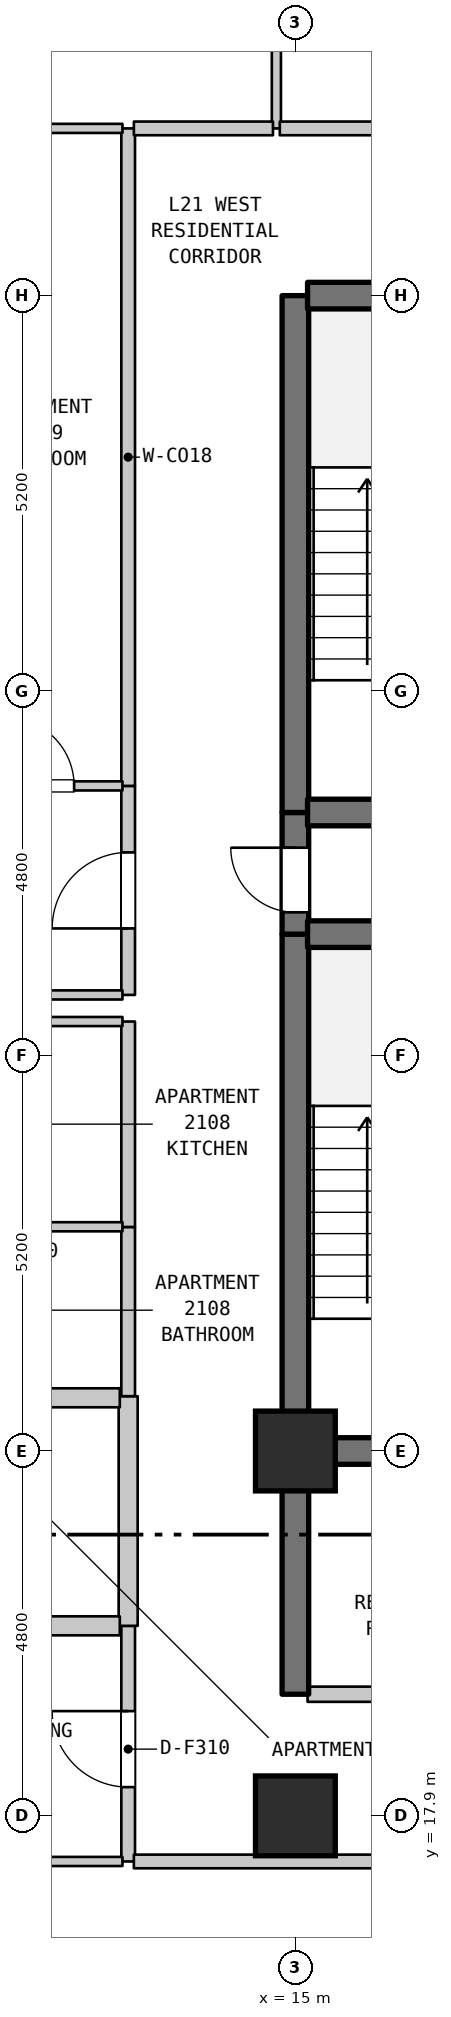
"""IFC4 building model, lengths in metres.
Left out: names, types, materials, properties, quantities, classifications, styles, units other than length and angle.
Written with IfcOpenShell. Run it as: python <this file> out.ifc"""

import sys

from ifc_helpers import new_model, si_unit, direction, frame, frame_2d, origin, origin_2d, place, context, subcontext, project, spatial, rectangle, extrude, element, fill, save


model = new_model("IFC4")
c1 = context("Model", 3, precision=1e-05, world=origin(), true_north=direction((0.0, 1.0)))
c2 = subcontext(c1, "Body", "Model", "MODEL_VIEW")
j1 = project(units=[si_unit("LENGTHUNIT", "METRE"), si_unit("PLANEANGLEUNIT", "RADIAN")], contexts=[c1])
p1 = place(None, origin())
s1 = spatial("IfcSite", under=j1, at=p1, CompositionType="ELEMENT")
p2 = place(p1, origin())
s2 = spatial("IfcBuilding", under=s1, at=p2, CompositionType="ELEMENT")
p3 = place(p2, frame((0.0, 0.0, 90.9)))
s3 = spatial("IfcBuildingStorey", under=s2, at=p3, CompositionType="ELEMENT", Elevation=90.9)
for number, where, z_axis, x_axis in (
    (1, (15.0, 17.9, 0.0), (0.0, 0.0, 1.0), (1.0, 0.0, 0.0)),
    (2, (15.0, 22.7, 0.0), (0.0, 0.0, 1.0), (1.0, 0.0, 0.0)),
):
    element("IfcColumn", number, at=place(p3, frame(where, z_axis=z_axis, x_axis=x_axis)), inside=s3, PredefinedType="COLUMN", context=c2, shape_type="SweptSolid", body=[
        extrude(rectangle(XDim=1.05, YDim=1.05, at=origin_2d()), origin(), (0.0, 0.0, 1.0), 3.7),
    ])
p4 = place(p3, frame((12.8, 17.3, 0.0), z_axis=(0.0, 0.0, 1.0), x_axis=(0.0, 1.0, 0.0)))
e3 = element("IfcWall", 3, at=p4, inside=s3, PredefinedType="STANDARD", context=c2, shape_type="SweptSolid", body=[
    extrude(rectangle(XDim=3.1, YDim=0.18, at=frame_2d((1.55, 0.0))), origin(), (0.0, 0.0, 1.0), 3.385),
])
p5 = place(p4, frame((0.978, 0.0, 0.0)))
e4 = element("IfcOpeningElement", 4, at=p5, cuts=e3, PredefinedType="OPENING", context=c2, shape_type="SweptSolid", body=[
    extrude(rectangle(XDim=1.0, YDim=2.15, at=frame_2d((0.5, 1.075))), frame((0.0, 0.1, 0.0), z_axis=(0.0, -1.0, 0.0), x_axis=(1.0, 0.0, 0.0)), (0.0, 0.0, 1.0), 0.2),
])
p6 = place(p3, frame((12.8, 20.4, 0.0), z_axis=(0.0, 0.0, 1.0), x_axis=(0.0, 1.0, 0.0)))
e5 = element("IfcWall", 5, at=p6, inside=s3, PredefinedType="STANDARD", context=c2, shape_type="SweptSolid", body=[
    extrude(rectangle(XDim=3.021, YDim=0.25, at=frame_2d((1.51, 0.0))), origin(), (0.0, 0.0, 1.0), 3.385),
])
p7 = place(p3, frame((12.8, 23.421, 0.0), z_axis=(0.0, 0.0, 1.0), x_axis=(0.0, 1.0, 0.0)))
e6 = element("IfcWall", 6, at=p7, inside=s3, PredefinedType="STANDARD", context=c2, shape_type="SweptSolid", body=[
    extrude(rectangle(XDim=2.226, YDim=0.18, at=frame_2d((1.113, 0.0))), origin(), (0.0, 0.0, 1.0), 3.385),
])
p8 = place(p3, frame((12.8, 25.647, 0.0), z_axis=(0.0, 0.0, 1.0), x_axis=(0.0, 1.0, 0.0)))
e7 = element("IfcWall", 7, at=p8, inside=s3, PredefinedType="STANDARD", context=c2, shape_type="SweptSolid", body=[
    extrude(rectangle(XDim=2.703, YDim=0.18, at=frame_2d((1.352, 0.0))), origin(), (0.0, 0.0, 1.0), 3.385),
])
p9 = place(p3, frame((12.8, 28.7, 0.0), z_axis=(0.0, 0.0, 1.0), x_axis=(0.0, 1.0, 0.0)))
e8 = element("IfcWall", 8, at=p9, inside=s3, PredefinedType="STANDARD", context=c2, shape_type="SweptSolid", body=[
    extrude(rectangle(XDim=2.75, YDim=0.18, at=frame_2d((1.375, 0.0))), origin(), (0.0, 0.0, 1.0), 3.385),
])
p10 = place(p9, frame((0.875, 0.0, 0.0)))
e9 = element("IfcOpeningElement", 9, at=p10, cuts=e8, PredefinedType="OPENING", context=c2, shape_type="SweptSolid", body=[
    extrude(rectangle(XDim=1.0, YDim=2.15, at=frame_2d((0.5, 1.075))), frame((0.0, 0.1, 0.0), z_axis=(0.0, -1.0, 0.0), x_axis=(1.0, 0.0, 0.0)), (0.0, 0.0, 1.0), 0.2),
])
p11 = place(p3, frame((12.8, 31.45, 0.0), z_axis=(0.0, 0.0, 1.0), x_axis=(0.0, 1.0, 0.0)))
e10 = element("IfcWall", 10, at=p11, inside=s3, PredefinedType="STANDARD", context=c2, shape_type="SweptSolid", body=[
    extrude(rectangle(XDim=8.65, YDim=0.18, at=frame_2d((4.325, 0.0))), origin(), (0.0, 0.0, 1.0), 3.385),
])
p12 = place(p3, frame((14.75, 40.1, 0.0), z_axis=(0.0, 0.0, 1.0), x_axis=(0.0, 1.0, 0.0)))
e11 = element("IfcWall", 11, at=p12, inside=s3, PredefinedType="PARTITIONING", context=c2, shape_type="SweptSolid", body=[
    extrude(rectangle(XDim=3.2, YDim=0.12, at=frame_2d((1.6, 0.0))), origin(), (0.0, 0.0, 1.0), 3.385),
])
p13 = place(p12, frame((1.15, 0.0, 0.0)))
e12 = element("IfcOpeningElement", 12, at=p13, cuts=e11, PredefinedType="OPENING", context=c2, shape_type="SweptSolid", body=[
    extrude(rectangle(XDim=0.9, YDim=2.15, at=frame_2d((0.45, 1.075))), frame((0.0, 0.07, 0.0), z_axis=(0.0, -1.0, 0.0), x_axis=(1.0, 0.0, 0.0)), (0.0, 0.0, 1.0), 0.14),
])
p14 = place(p3, frame((15.0, 19.5, 0.0), z_axis=(0.0, 0.0, 1.0), x_axis=(0.0, 1.0, 0.0)))
e13 = element("IfcWall", 13, at=p14, inside=s3, PredefinedType="SHEAR", context=c2, shape_type="SweptSolid", body=[
    extrude(rectangle(XDim=3.2, YDim=0.35, at=frame_2d((1.6, 0.0))), origin(), (0.0, 0.0, 1.0), 3.385),
])
p15 = place(p3, frame((15.0, 22.7, 0.0), z_axis=(0.0, 0.0, 1.0), x_axis=(0.0, 1.0, 0.0)))
e14 = element("IfcWall", 14, at=p15, inside=s3, PredefinedType="SHEAR", context=c2, shape_type="SweptSolid", body=[
    extrude(rectangle(XDim=6.8, YDim=0.35, at=frame_2d((3.4, 0.0))), origin(), (0.0, 0.0, 1.0), 3.385),
])
p16 = place(p3, frame((15.0, 29.5, 0.0), z_axis=(0.0, 0.0, 1.0), x_axis=(0.0, 1.0, 0.0)))
e15 = element("IfcWall", 15, at=p16, inside=s3, PredefinedType="SHEAR", context=c2, shape_type="SweptSolid", body=[
    extrude(rectangle(XDim=1.6, YDim=0.35, at=frame_2d((0.8, 0.0))), origin(), (0.0, 0.0, 1.0), 3.385),
])
p17 = place(p16, frame((0.287, 0.0, 0.0)))
e16 = element("IfcOpeningElement", 16, at=p17, cuts=e15, PredefinedType="OPENING", context=c2, shape_type="SweptSolid", body=[
    extrude(rectangle(XDim=0.85, YDim=2.1, at=frame_2d((0.425, 1.05))), frame((0.0, 0.185, 0.0), z_axis=(0.0, -1.0, 0.0), x_axis=(1.0, 0.0, 0.0)), (0.0, 0.0, 1.0), 0.37),
])
p18 = place(p3, frame((15.0, 31.1, 0.0), z_axis=(0.0, 0.0, 1.0), x_axis=(0.0, 1.0, 0.0)))
e17 = element("IfcWall", 17, at=p18, inside=s3, PredefinedType="SHEAR", context=c2, shape_type="SweptSolid", body=[
    extrude(rectangle(XDim=6.8, YDim=0.35, at=frame_2d((3.4, 0.0))), origin(), (0.0, 0.0, 1.0), 3.385),
])
p19 = place(p3, frame((9.085, 17.3, 0.0), z_axis=(0.0, 0.0, 1.0), x_axis=(1.0, 0.0, 0.0)))
e18 = element("IfcWall", 18, at=p19, inside=s3, PredefinedType="PARTITIONING", context=c2, shape_type="SweptSolid", body=[
    extrude(rectangle(XDim=3.64, YDim=0.12, at=frame_2d((1.82, 0.0))), origin(), (0.0, 0.0, 1.0), 3.385),
])
p20 = place(p3, frame((12.875, 17.3, 0.0), z_axis=(0.0, 0.0, 1.0), x_axis=(1.0, 0.0, 0.0)))
e19 = element("IfcWall", 19, at=p20, inside=s3, PredefinedType="STANDARD", context=c2, shape_type="SweptSolid", body=[
    extrude(rectangle(XDim=7.35, YDim=0.18, at=frame_2d((3.675, 0.0))), origin(), (0.0, 0.0, 1.0), 3.385),
])
p21 = place(p20, frame((3.16, 0.0, 0.0)))
e20 = element("IfcOpeningElement", 20, at=p21, cuts=e19, PredefinedType="OPENING", context=c2, shape_type="SweptSolid", body=[
    extrude(rectangle(XDim=1.0, YDim=2.15, at=frame_2d((0.5, 1.075))), frame((0.0, 0.1, 0.0), z_axis=(0.0, -1.0, 0.0), x_axis=(1.0, 0.0, 0.0)), (0.0, 0.0, 1.0), 0.2),
])
p22 = place(p3, frame((15.16, 19.5, 0.0), z_axis=(0.0, 0.0, 1.0), x_axis=(1.0, 0.0, 0.0)))
e21 = element("IfcWall", 21, at=p22, inside=s3, PredefinedType="STANDARD", context=c2, shape_type="SweptSolid", body=[
    extrude(rectangle(XDim=3.68, YDim=0.2, at=frame_2d((1.84, 0.0))), origin(), (0.0, 0.0, 1.0), 3.385),
])
p23 = place(p22, frame((1.39, 0.0, 0.0)))
e22 = element("IfcOpeningElement", 22, at=p23, cuts=e21, PredefinedType="OPENING", context=c2, shape_type="SweptSolid", body=[
    extrude(rectangle(XDim=0.9, YDim=2.15, at=frame_2d((0.45, 1.075))), frame((0.0, 0.11, 0.0), z_axis=(0.0, -1.0, 0.0), x_axis=(1.0, 0.0, 0.0)), (0.0, 0.0, 1.0), 0.22),
])
p24 = place(p3, frame((10.66, 20.4, 0.0), z_axis=(0.0, 0.0, 1.0), x_axis=(1.0, 0.0, 0.0)))
e23 = element("IfcWall", 23, at=p24, inside=s3, PredefinedType="STANDARD", context=c2, shape_type="SweptSolid", body=[
    extrude(rectangle(XDim=2.03, YDim=0.25, at=frame_2d((1.015, 0.0))), origin(), (0.0, 0.0, 1.0), 3.385),
])
p25 = place(p3, frame((15.16, 22.7, 0.0), z_axis=(0.0, 0.0, 1.0), x_axis=(1.0, 0.0, 0.0)))
e24 = element("IfcWall", 24, at=p25, inside=s3, PredefinedType="SHEAR", context=c2, shape_type="SweptSolid", body=[
    extrude(rectangle(XDim=3.68, YDim=0.35, at=frame_2d((1.84, 0.0))), origin(), (0.0, 0.0, 1.0), 3.385),
])
p26 = place(p3, frame((10.66, 23.4, 0.0), z_axis=(0.0, 0.0, 1.0), x_axis=(1.0, 0.0, 0.0)))
e25 = element("IfcWall", 25, at=p26, inside=s3, PredefinedType="STANDARD", context=c2, shape_type="SweptSolid", body=[
    extrude(rectangle(XDim=2.03, YDim=0.25, at=frame_2d((1.015, 0.0))), origin(), (0.0, 0.0, 1.0), 3.385),
])
for number, where, z_axis, x_axis in (
    (26, (10.595, 25.65, 0.0), (0.0, 0.0, 1.0), (1.0, 0.0, 0.0)),
    (27, (10.595, 28.35, 0.0), (0.0, 0.0, 1.0), (1.0, 0.0, 0.0)),
):
    element("IfcWall", number, at=place(p3, frame(where, z_axis=z_axis, x_axis=x_axis)), inside=s3, PredefinedType="PARTITIONING", context=c2, shape_type="SweptSolid", body=[
        extrude(rectangle(XDim=2.13, YDim=0.12, at=frame_2d((1.065, 0.0))), origin(), (0.0, 0.0, 1.0), 3.385),
    ])
p27 = place(p3, frame((9.03, 28.7, 0.0), z_axis=(0.0, 0.0, 1.0), x_axis=(1.0, 0.0, 0.0)))
e28 = element("IfcWall", 28, at=p27, inside=s3, PredefinedType="PARTITIONING", context=c2, shape_type="SweptSolid", body=[
    extrude(rectangle(XDim=3.695, YDim=0.12, at=frame_2d((1.848, 0.0))), origin(), (0.0, 0.0, 1.0), 3.385),
])
for number, where, z_axis, x_axis in (
    (29, (15.16, 29.5, 0.0), (0.0, 0.0, 1.0), (1.0, 0.0, 0.0)),
    (30, (15.16, 31.1, 0.0), (0.0, 0.0, 1.0), (1.0, 0.0, 0.0)),
):
    element("IfcWall", number, at=place(p3, frame(where, z_axis=z_axis, x_axis=x_axis)), inside=s3, PredefinedType="SHEAR", context=c2, shape_type="SweptSolid", body=[
        extrude(rectangle(XDim=3.68, YDim=0.35, at=frame_2d((1.84, 0.0))), origin(), (0.0, 0.0, 1.0), 3.385),
    ])
p28 = place(p3, frame((10.523, 31.45, 0.0), z_axis=(0.0, 0.0, 1.0), x_axis=(1.0, 0.0, 0.0)))
e31 = element("IfcWall", 31, at=p28, inside=s3, PredefinedType="PARTITIONING", context=c2, shape_type="SweptSolid", body=[
    extrude(rectangle(XDim=2.202, YDim=0.12, at=frame_2d((1.101, 0.0))), origin(), (0.0, 0.0, 1.0), 3.385),
])
p29 = place(p28, frame((0.666, 0.0, 0.0)))
e32 = element("IfcOpeningElement", 32, at=p29, cuts=e31, PredefinedType="OPENING", context=c2, shape_type="SweptSolid", body=[
    extrude(rectangle(XDim=0.9, YDim=2.1, at=frame_2d((0.45, 1.05))), frame((0.0, 0.07, 0.0), z_axis=(0.0, -1.0, 0.0), x_axis=(1.0, 0.0, 0.0)), (0.0, 0.0, 1.0), 0.14),
])
p30 = place(p3, frame((15.16, 37.9, 0.0), z_axis=(0.0, 0.0, 1.0), x_axis=(1.0, 0.0, 0.0)))
e33 = element("IfcWall", 33, at=p30, inside=s3, PredefinedType="SHEAR", context=c2, shape_type="SweptSolid", body=[
    extrude(rectangle(XDim=3.68, YDim=0.35, at=frame_2d((1.84, 0.0))), origin(), (0.0, 0.0, 1.0), 3.385),
])
p31 = place(p3, frame((10.523, 40.1, 0.0), z_axis=(0.0, 0.0, 1.0), x_axis=(1.0, 0.0, 0.0)))
e34 = element("IfcWall", 34, at=p31, inside=s3, PredefinedType="PARTITIONING", context=c2, shape_type="SweptSolid", body=[
    extrude(rectangle(XDim=2.202, YDim=0.12, at=frame_2d((1.101, 0.0))), origin(), (0.0, 0.0, 1.0), 3.385),
])
p32 = place(p3, frame((12.875, 40.1, 0.0), z_axis=(0.0, 0.0, 1.0), x_axis=(1.0, 0.0, 0.0)))
e35 = element("IfcWall", 35, at=p32, inside=s3, PredefinedType="STANDARD", context=c2, shape_type="SweptSolid", body=[
    extrude(rectangle(XDim=1.83, YDim=0.18, at=frame_2d((0.915, 0.0))), origin(), (0.0, 0.0, 1.0), 3.385),
])
p33 = place(p3, frame((14.795, 40.1, 0.0), z_axis=(0.0, 0.0, 1.0), x_axis=(1.0, 0.0, 0.0)))
e36 = element("IfcWall", 36, at=p33, inside=s3, PredefinedType="STANDARD", context=c2, shape_type="SweptSolid", body=[
    extrude(rectangle(XDim=2.26, YDim=0.18, at=frame_2d((1.13, 0.0))), origin(), (0.0, 0.0, 1.0), 3.385),
])
p34 = place(p5, origin())
e37 = element("IfcDoor", 37, at=p34, inside=s3, OperationType="SINGLE_SWING_RIGHT", PredefinedType="DOOR", context=c2, shape_type="SweptSolid", body=[
    extrude(rectangle(XDim=1.0, YDim=2.15, at=frame_2d((0.5, 1.075))), frame((0.0, 0.025, 0.0), z_axis=(0.0, -1.0, 0.0), x_axis=(1.0, 0.0, 0.0)), (0.0, 0.0, 1.0), 0.05),
])
fill(e4, e37)
p35 = place(p10, origin())
e38 = element("IfcDoor", 38, at=p35, inside=s3, OperationType="SINGLE_SWING_LEFT", PredefinedType="DOOR", context=c2, shape_type="SweptSolid", body=[
    extrude(rectangle(XDim=1.0, YDim=2.15, at=frame_2d((0.5, 1.075))), frame((0.0, 0.025, 0.0), z_axis=(0.0, -1.0, 0.0), x_axis=(1.0, 0.0, 0.0)), (0.0, 0.0, 1.0), 0.05),
])
fill(e9, e38)
p36 = place(p17, origin())
e39 = element("IfcDoor", 39, at=p36, inside=s3, OperationType="SINGLE_SWING_RIGHT", PredefinedType="DOOR", context=c2, shape_type="SweptSolid", body=[
    extrude(rectangle(XDim=0.85, YDim=2.1, at=frame_2d((0.425, 1.05))), frame((0.0, 0.025, 0.0), z_axis=(0.0, -1.0, 0.0), x_axis=(1.0, 0.0, 0.0)), (0.0, 0.0, 1.0), 0.05),
])
fill(e16, e39)
p37 = place(p29, origin())
e40 = element("IfcDoor", 40, at=p37, inside=s3, OperationType="SINGLE_SWING_LEFT", PredefinedType="DOOR", context=c2, shape_type="SweptSolid", body=[
    extrude(rectangle(XDim=0.9, YDim=2.1, at=frame_2d((0.45, 1.05))), frame((0.0, 0.025, 0.0), z_axis=(0.0, -1.0, 0.0), x_axis=(1.0, 0.0, 0.0)), (0.0, 0.0, 1.0), 0.05),
])
fill(e32, e40)
save(model, sys.argv[1])
